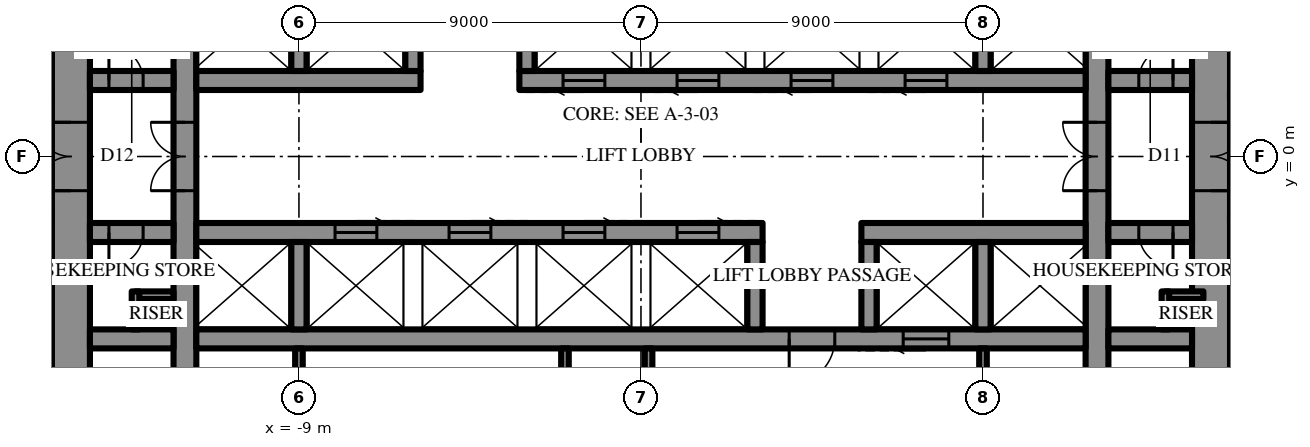
"""IFC4 building model, lengths in metres.
Left out: names, types, materials, properties, quantities, classifications, styles, units other than length and angle.
Written with IfcOpenShell. Run it as: python <this file> out.ifc"""

import sys

from ifc_helpers import new_model, si_unit, direction, frame, frame_2d, origin, place, context, subcontext, project, spatial, rectangle, extrude, element, fill, save


model = new_model("IFC4")
c1 = context("Model", 3, precision=1e-05, world=origin(), true_north=direction((0.0, 1.0)))
c2 = subcontext(c1, "Body", "Model", "MODEL_VIEW")
j1 = project(units=[si_unit("LENGTHUNIT", "METRE"), si_unit("PLANEANGLEUNIT", "RADIAN")], contexts=[c1])
p1 = place(None, origin())
s1 = spatial("IfcSite", under=j1, at=p1, CompositionType="ELEMENT")
p2 = place(p1, origin())
s2 = spatial("IfcBuilding", under=s1, at=p2, CompositionType="ELEMENT")
p3 = place(p2, frame((0.0, 0.0, 249.1)))
s3 = spatial("IfcBuildingStorey", under=s2, at=p3, CompositionType="ELEMENT", Elevation=249.1)
p4 = place(p3, frame((15.0, -10.7, 0.0), z_axis=(0.0, 0.0, 1.0), x_axis=(0.0, 1.0, 0.0)))
e1 = element("IfcWall", 1, at=p4, inside=s3, PredefinedType="SHEAR", context=c2, shape_type="SweptSolid", body=[
    extrude(rectangle(XDim=21.4, YDim=1.0, at=frame_2d((10.7, 0.0))), origin(), (0.0, 0.0, 1.0), 4.2),
])
p5 = place(p4, frame((9.8, 0.0, 0.0)))
e2 = element("IfcOpeningElement", 2, at=p5, cuts=e1, PredefinedType="OPENING", context=c2, shape_type="SweptSolid", body=[
    extrude(rectangle(XDim=1.8, YDim=2.4, at=frame_2d((0.9, 1.2))), frame((0.0, 0.51, 0.0), z_axis=(0.0, -1.0, 0.0), x_axis=(1.0, 0.0, 0.0)), (0.0, 0.0, 1.0), 1.02),
])
p6 = place(p3, frame((-15.0, 10.7, 0.0), z_axis=(0.0, 0.0, 1.0), x_axis=(0.0, -1.0, 0.0)))
e3 = element("IfcWall", 3, at=p6, inside=s3, PredefinedType="SHEAR", context=c2, shape_type="SweptSolid", body=[
    extrude(rectangle(XDim=21.4, YDim=1.0, at=frame_2d((10.7, 0.0))), origin(), (0.0, 0.0, 1.0), 4.2),
])
p7 = place(p6, frame((9.8, 0.0, 0.0)))
e4 = element("IfcOpeningElement", 4, at=p7, cuts=e3, PredefinedType="OPENING", context=c2, shape_type="SweptSolid", body=[
    extrude(rectangle(XDim=1.8, YDim=2.4, at=frame_2d((0.9, 1.2))), frame((0.0, 0.51, 0.0), z_axis=(0.0, -1.0, 0.0), x_axis=(1.0, 0.0, 0.0)), (0.0, 0.0, 1.0), 1.02),
])
p8 = place(p3, frame((12.0, -10.7, 0.0), z_axis=(0.0, 0.0, 1.0), x_axis=(0.0, 1.0, 0.0)))
e5 = element("IfcWall", 5, at=p8, inside=s3, PredefinedType="SHEAR", context=c2, shape_type="SweptSolid", body=[
    extrude(rectangle(XDim=21.4, YDim=0.6, at=frame_2d((10.7, 0.0))), origin(), (0.0, 0.0, 1.0), 4.2),
])
p9 = place(p8, frame((9.8, 0.0, 0.0)))
e6 = element("IfcOpeningElement", 6, at=p9, cuts=e5, PredefinedType="OPENING", context=c2, shape_type="SweptSolid", body=[
    extrude(rectangle(XDim=1.8, YDim=2.4, at=frame_2d((0.9, 1.2))), frame((0.0, 0.31, 0.0), z_axis=(0.0, -1.0, 0.0), x_axis=(1.0, 0.0, 0.0)), (0.0, 0.0, 1.0), 0.62),
])
p10 = place(p3, frame((-12.0, -10.7, 0.0), z_axis=(0.0, 0.0, 1.0), x_axis=(0.0, 1.0, 0.0)))
e7 = element("IfcWall", 7, at=p10, inside=s3, PredefinedType="SHEAR", context=c2, shape_type="SweptSolid", body=[
    extrude(rectangle(XDim=21.4, YDim=0.6, at=frame_2d((10.7, 0.0))), origin(), (0.0, 0.0, 1.0), 4.2),
])
p11 = place(p10, frame((9.8, 0.0, 0.0)))
e8 = element("IfcOpeningElement", 8, at=p11, cuts=e7, PredefinedType="OPENING", context=c2, shape_type="SweptSolid", body=[
    extrude(rectangle(XDim=1.8, YDim=2.4, at=frame_2d((0.9, 1.2))), frame((0.0, 0.31, 0.0), z_axis=(0.0, -1.0, 0.0), x_axis=(1.0, 0.0, 0.0)), (0.0, 0.0, 1.0), 0.62),
])
p12 = place(p3, frame((-14.5, 2.0, 0.0), z_axis=(0.0, 0.0, 1.0), x_axis=(1.0, 0.0, 0.0)))
e9 = element("IfcWall", 9, at=p12, inside=s3, PredefinedType="SHEAR", context=c2, shape_type="SweptSolid", body=[
    extrude(rectangle(XDim=2.2, YDim=0.5, at=frame_2d((1.1, 0.0))), origin(), (0.0, 0.0, 1.0), 4.2),
])
p13 = place(p12, frame((0.5, 0.0, 0.0)))
e10 = element("IfcOpeningElement", 10, at=p13, cuts=e9, PredefinedType="OPENING", context=c2, shape_type="SweptSolid", body=[
    extrude(rectangle(XDim=0.9, YDim=2.2, at=frame_2d((0.45, 1.1))), frame((0.0, 0.26, 0.0), z_axis=(0.0, -1.0, 0.0), x_axis=(1.0, 0.0, 0.0)), (0.0, 0.0, 1.0), 0.52),
])
p14 = place(p3, frame((-11.7, 2.0, 0.0), z_axis=(0.0, 0.0, 1.0), x_axis=(1.0, 0.0, 0.0)))
e11 = element("IfcWall", 11, at=p14, inside=s3, PredefinedType="SHEAR", context=c2, shape_type="SweptSolid", body=[
    extrude(rectangle(XDim=5.9, YDim=0.5, at=frame_2d((2.95, 0.0))), origin(), (0.0, 0.0, 1.0), 4.2),
])
p15 = place(p3, frame((-3.2, 2.0, 0.0), z_axis=(0.0, 0.0, 1.0), x_axis=(1.0, 0.0, 0.0)))
e12 = element("IfcWall", 12, at=p15, inside=s3, PredefinedType="SHEAR", context=c2, shape_type="SweptSolid", body=[
    extrude(rectangle(XDim=14.9, YDim=0.5, at=frame_2d((7.45, 0.0))), origin(), (0.0, 0.0, 1.0), 4.2),
])
p16 = place(p15, frame((1.15, 0.0, 0.0)))
e13 = element("IfcOpeningElement", 13, at=p16, cuts=e12, PredefinedType="OPENING", context=c2, shape_type="SweptSolid", body=[
    extrude(rectangle(XDim=1.1, YDim=2.2, at=frame_2d((0.55, 1.1))), frame((0.0, 0.26, 0.0), z_axis=(0.0, -1.0, 0.0), x_axis=(1.0, 0.0, 0.0)), (0.0, 0.0, 1.0), 0.52),
])
p17 = place(p15, frame((4.15, 0.0, 0.0)))
e14 = element("IfcOpeningElement", 14, at=p17, cuts=e12, PredefinedType="OPENING", context=c2, shape_type="SweptSolid", body=[
    extrude(rectangle(XDim=1.1, YDim=2.2, at=frame_2d((0.55, 1.1))), frame((0.0, 0.26, 0.0), z_axis=(0.0, -1.0, 0.0), x_axis=(1.0, 0.0, 0.0)), (0.0, 0.0, 1.0), 0.52),
])
p18 = place(p15, frame((7.15, 0.0, 0.0)))
e15 = element("IfcOpeningElement", 15, at=p18, cuts=e12, PredefinedType="OPENING", context=c2, shape_type="SweptSolid", body=[
    extrude(rectangle(XDim=1.1, YDim=2.2, at=frame_2d((0.55, 1.1))), frame((0.0, 0.26, 0.0), z_axis=(0.0, -1.0, 0.0), x_axis=(1.0, 0.0, 0.0)), (0.0, 0.0, 1.0), 0.52),
])
p19 = place(p15, frame((10.15, 0.0, 0.0)))
e16 = element("IfcOpeningElement", 16, at=p19, cuts=e12, PredefinedType="OPENING", context=c2, shape_type="SweptSolid", body=[
    extrude(rectangle(XDim=1.1, YDim=2.2, at=frame_2d((0.55, 1.1))), frame((0.0, 0.26, 0.0), z_axis=(0.0, -1.0, 0.0), x_axis=(1.0, 0.0, 0.0)), (0.0, 0.0, 1.0), 0.52),
])
p20 = place(p3, frame((12.3, 2.0, 0.0), z_axis=(0.0, 0.0, 1.0), x_axis=(1.0, 0.0, 0.0)))
e17 = element("IfcWall", 17, at=p20, inside=s3, PredefinedType="SHEAR", context=c2, shape_type="SweptSolid", body=[
    extrude(rectangle(XDim=2.2, YDim=0.5, at=frame_2d((1.1, 0.0))), origin(), (0.0, 0.0, 1.0), 4.2),
])
p21 = place(p20, frame((0.8, 0.0, 0.0)))
e18 = element("IfcOpeningElement", 18, at=p21, cuts=e17, PredefinedType="OPENING", context=c2, shape_type="SweptSolid", body=[
    extrude(rectangle(XDim=0.9, YDim=2.2, at=frame_2d((0.45, 1.1))), frame((0.0, 0.26, 0.0), z_axis=(0.0, -1.0, 0.0), x_axis=(1.0, 0.0, 0.0)), (0.0, 0.0, 1.0), 0.52),
])
for number, where, z_axis, x_axis in (
    (19, (-9.0, 2.25, 0.0), (0.0, 0.0, 1.0), (0.0, 1.0, 0.0)),
    (20, (-6.0, 2.25, 0.0), (0.0, 0.0, 1.0), (0.0, 1.0, 0.0)),
    (21, (-3.0, 2.25, 0.0), (0.0, 0.0, 1.0), (0.0, 1.0, 0.0)),
    (22, (9.0, 2.25, 0.0), (0.0, 0.0, 1.0), (0.0, 1.0, 0.0)),
):
    element("IfcWall", number, at=place(p3, frame(where, z_axis=z_axis, x_axis=x_axis)), inside=s3, PredefinedType="SHEAR", context=c2, shape_type="SweptSolid", body=[
        extrude(rectangle(XDim=2.3, YDim=0.4, at=frame_2d((1.15, 0.0))), origin(), (0.0, 0.0, 1.0), 4.2),
    ])
p22 = place(p3, frame((14.5, -2.0, 0.0), z_axis=(0.0, 0.0, 1.0), x_axis=(-1.0, 0.0, 0.0)))
e23 = element("IfcWall", 23, at=p22, inside=s3, PredefinedType="SHEAR", context=c2, shape_type="SweptSolid", body=[
    extrude(rectangle(XDim=2.2, YDim=0.5, at=frame_2d((1.1, 0.0))), origin(), (0.0, 0.0, 1.0), 4.2),
])
p23 = place(p22, frame((0.5, 0.0, 0.0)))
e24 = element("IfcOpeningElement", 24, at=p23, cuts=e23, PredefinedType="OPENING", context=c2, shape_type="SweptSolid", body=[
    extrude(rectangle(XDim=0.9, YDim=2.2, at=frame_2d((0.45, 1.1))), frame((0.0, 0.26, 0.0), z_axis=(0.0, -1.0, 0.0), x_axis=(1.0, 0.0, 0.0)), (0.0, 0.0, 1.0), 0.52),
])
p24 = place(p3, frame((11.7, -2.0, 0.0), z_axis=(0.0, 0.0, 1.0), x_axis=(-1.0, 0.0, 0.0)))
e25 = element("IfcWall", 25, at=p24, inside=s3, PredefinedType="SHEAR", context=c2, shape_type="SweptSolid", body=[
    extrude(rectangle(XDim=5.9, YDim=0.5, at=frame_2d((2.95, 0.0))), origin(), (0.0, 0.0, 1.0), 4.2),
])
p25 = place(p3, frame((3.2, -2.0, 0.0), z_axis=(0.0, 0.0, 1.0), x_axis=(-1.0, 0.0, 0.0)))
e26 = element("IfcWall", 26, at=p25, inside=s3, PredefinedType="SHEAR", context=c2, shape_type="SweptSolid", body=[
    extrude(rectangle(XDim=14.9, YDim=0.5, at=frame_2d((7.45, 0.0))), origin(), (0.0, 0.0, 1.0), 4.2),
])
p26 = place(p25, frame((1.15, 0.0, 0.0)))
e27 = element("IfcOpeningElement", 27, at=p26, cuts=e26, PredefinedType="OPENING", context=c2, shape_type="SweptSolid", body=[
    extrude(rectangle(XDim=1.1, YDim=2.2, at=frame_2d((0.55, 1.1))), frame((0.0, 0.26, 0.0), z_axis=(0.0, -1.0, 0.0), x_axis=(1.0, 0.0, 0.0)), (0.0, 0.0, 1.0), 0.52),
])
p27 = place(p25, frame((4.15, 0.0, 0.0)))
e28 = element("IfcOpeningElement", 28, at=p27, cuts=e26, PredefinedType="OPENING", context=c2, shape_type="SweptSolid", body=[
    extrude(rectangle(XDim=1.1, YDim=2.2, at=frame_2d((0.55, 1.1))), frame((0.0, 0.26, 0.0), z_axis=(0.0, -1.0, 0.0), x_axis=(1.0, 0.0, 0.0)), (0.0, 0.0, 1.0), 0.52),
])
p28 = place(p25, frame((7.15, 0.0, 0.0)))
e29 = element("IfcOpeningElement", 29, at=p28, cuts=e26, PredefinedType="OPENING", context=c2, shape_type="SweptSolid", body=[
    extrude(rectangle(XDim=1.1, YDim=2.2, at=frame_2d((0.55, 1.1))), frame((0.0, 0.26, 0.0), z_axis=(0.0, -1.0, 0.0), x_axis=(1.0, 0.0, 0.0)), (0.0, 0.0, 1.0), 0.52),
])
p29 = place(p25, frame((10.15, 0.0, 0.0)))
e30 = element("IfcOpeningElement", 30, at=p29, cuts=e26, PredefinedType="OPENING", context=c2, shape_type="SweptSolid", body=[
    extrude(rectangle(XDim=1.1, YDim=2.2, at=frame_2d((0.55, 1.1))), frame((0.0, 0.26, 0.0), z_axis=(0.0, -1.0, 0.0), x_axis=(1.0, 0.0, 0.0)), (0.0, 0.0, 1.0), 0.52),
])
p30 = place(p3, frame((-12.3, -2.0, 0.0), z_axis=(0.0, 0.0, 1.0), x_axis=(-1.0, 0.0, 0.0)))
e31 = element("IfcWall", 31, at=p30, inside=s3, PredefinedType="SHEAR", context=c2, shape_type="SweptSolid", body=[
    extrude(rectangle(XDim=2.2, YDim=0.5, at=frame_2d((1.1, 0.0))), origin(), (0.0, 0.0, 1.0), 4.2),
])
p31 = place(p30, frame((0.8, 0.0, 0.0)))
e32 = element("IfcOpeningElement", 32, at=p31, cuts=e31, PredefinedType="OPENING", context=c2, shape_type="SweptSolid", body=[
    extrude(rectangle(XDim=0.9, YDim=2.2, at=frame_2d((0.45, 1.1))), frame((0.0, 0.26, 0.0), z_axis=(0.0, -1.0, 0.0), x_axis=(1.0, 0.0, 0.0)), (0.0, 0.0, 1.0), 0.52),
])
p32 = place(p3, frame((14.5, -4.8, 0.0), z_axis=(0.0, 0.0, 1.0), x_axis=(-1.0, 0.0, 0.0)))
e33 = element("IfcWall", 33, at=p32, inside=s3, PredefinedType="SHEAR", context=c2, shape_type="SweptSolid", body=[
    extrude(rectangle(XDim=2.2, YDim=0.5, at=frame_2d((1.1, 0.0))), origin(), (0.0, 0.0, 1.0), 4.2),
])
p33 = place(p3, frame((11.7, -4.8, 0.0), z_axis=(0.0, 0.0, 1.0), x_axis=(-1.0, 0.0, 0.0)))
e34 = element("IfcWall", 34, at=p33, inside=s3, PredefinedType="SHEAR", context=c2, shape_type="SweptSolid", body=[
    extrude(rectangle(XDim=23.4, YDim=0.5, at=frame_2d((11.7, 0.0))), origin(), (0.0, 0.0, 1.0), 4.2),
])
p34 = place(p33, frame((6.6, 0.0, 0.0)))
e35 = element("IfcOpeningElement", 35, at=p34, cuts=e34, PredefinedType="OPENING", context=c2, shape_type="SweptSolid", body=[
    extrude(rectangle(XDim=1.2, YDim=2.2, at=frame_2d((0.6, 1.1))), frame((0.0, 0.26, 0.0), z_axis=(0.0, -1.0, 0.0), x_axis=(1.0, 0.0, 0.0)), (0.0, 0.0, 1.0), 0.52),
])
p35 = place(p33, frame((3.6, 0.0, 0.0)))
e36 = element("IfcOpeningElement", 36, at=p35, cuts=e34, PredefinedType="OPENING", context=c2, shape_type="SweptSolid", body=[
    extrude(rectangle(XDim=1.2, YDim=2.2, at=frame_2d((0.6, 1.1))), frame((0.0, 0.26, 0.0), z_axis=(0.0, -1.0, 0.0), x_axis=(1.0, 0.0, 0.0)), (0.0, 0.0, 1.0), 0.52),
])
p36 = place(p3, frame((-12.3, -4.8, 0.0), z_axis=(0.0, 0.0, 1.0), x_axis=(-1.0, 0.0, 0.0)))
e37 = element("IfcWall", 37, at=p36, inside=s3, PredefinedType="SHEAR", context=c2, shape_type="SweptSolid", body=[
    extrude(rectangle(XDim=2.2, YDim=0.5, at=frame_2d((1.1, 0.0))), origin(), (0.0, 0.0, 1.0), 4.2),
])
for number, where, z_axis, x_axis in (
    (38, (9.0, -2.25, 0.0), (0.0, 0.0, 1.0), (0.0, -1.0, 0.0)),
    (39, (6.0, -2.25, 0.0), (0.0, 0.0, 1.0), (0.0, -1.0, 0.0)),
    (40, (3.0, -2.25, 0.0), (0.0, 0.0, 1.0), (0.0, -1.0, 0.0)),
    (41, (-9.0, -2.25, 0.0), (0.0, 0.0, 1.0), (0.0, -1.0, 0.0)),
):
    element("IfcWall", number, at=place(p3, frame(where, z_axis=z_axis, x_axis=x_axis)), inside=s3, PredefinedType="SHEAR", context=c2, shape_type="SweptSolid", body=[
        extrude(rectangle(XDim=2.3, YDim=0.4, at=frame_2d((1.15, 0.0))), origin(), (0.0, 0.0, 1.0), 4.2),
    ])
p37 = place(p3, frame((0.2, -5.05, 0.0), z_axis=(0.0, 0.0, 1.0), x_axis=(0.0, -1.0, 0.0)))
e42 = element("IfcWall", 42, at=p37, inside=s3, PredefinedType="SHEAR", context=c2, shape_type="SweptSolid", body=[
    extrude(rectangle(XDim=5.65, YDim=0.2, at=frame_2d((2.825, 0.0))), origin(), (0.0, 0.0, 1.0), 4.2),
])
for number, where, z_axis, x_axis in (
    (43, (9.0, -5.05, 0.0), (0.0, 0.0, 1.0), (0.0, -1.0, 0.0)),
    (44, (-9.0, -5.05, 0.0), (0.0, 0.0, 1.0), (0.0, -1.0, 0.0)),
    (45, (-2.0, -5.05, 0.0), (0.0, 0.0, 1.0), (0.0, -1.0, 0.0)),
):
    element("IfcWall", number, at=place(p3, frame(where, z_axis=z_axis, x_axis=x_axis)), inside=s3, PredefinedType="PARTITIONING", context=c2, shape_type="SweptSolid", body=[
        extrude(rectangle(XDim=5.65, YDim=0.2, at=frame_2d((2.825, 0.0))), origin(), (0.0, 0.0, 1.0), 4.0),
    ])
for number, where, z_axis, x_axis in (
    (46, (14.8, -3.65, 0.0), (0.0, 0.0, 1.0), (-1.0, 0.0, 0.0)),
    (47, (13.8, -3.55, 0.0), (0.0, 0.0, 1.0), (0.0, -1.0, 0.0)),
    (48, (-12.3, -3.65, 0.0), (0.0, 0.0, 1.0), (-1.0, 0.0, 0.0)),
    (49, (-13.3, -3.55, 0.0), (0.0, 0.0, 1.0), (0.0, -1.0, 0.0)),
):
    element("IfcWall", number, at=place(p3, frame(where, z_axis=z_axis, x_axis=x_axis)), inside=s3, PredefinedType="PARTITIONING", context=c2, shape_type="SweptSolid", body=[
        extrude(rectangle(XDim=1.0, YDim=0.2, at=frame_2d((0.5, 0.0))), origin(), (0.0, 0.0, 1.0), 4.0),
    ])
p38 = place(p3, frame((15.5, 1.6, 0.0), z_axis=(0.0, 0.0, 1.0), x_axis=(1.0, 0.0, 0.0)))
e50 = element("IfcWall", 50, at=p38, inside=s3, PredefinedType="PARTITIONING", context=c2, shape_type="SweptSolid", body=[
    extrude(rectangle(XDim=2.3, YDim=0.2, at=frame_2d((1.15, 0.0))), origin(), (0.0, 0.0, 1.0), 4.0),
])
p39 = place(p5, frame((1.8, 0.0, 0.0), z_axis=(0.0, 0.0, 1.0), x_axis=(-1.0, 0.0, 0.0)))
e51 = element("IfcDoor", 51, at=p39, inside=s3, OperationType="DOUBLE_DOOR_SINGLE_SWING", PredefinedType="DOOR", context=c2, shape_type="SweptSolid", body=[
    extrude(rectangle(XDim=1.8, YDim=2.4, at=frame_2d((0.9, 1.2))), frame((0.0, 0.025, 0.0), z_axis=(0.0, -1.0, 0.0), x_axis=(1.0, 0.0, 0.0)), (0.0, 0.0, 1.0), 0.05),
])
fill(e2, e51)
p40 = place(p7, frame((1.8, 0.0, 0.0), z_axis=(0.0, 0.0, 1.0), x_axis=(-1.0, 0.0, 0.0)))
e52 = element("IfcDoor", 52, at=p40, inside=s3, OperationType="DOUBLE_DOOR_SINGLE_SWING", PredefinedType="DOOR", context=c2, shape_type="SweptSolid", body=[
    extrude(rectangle(XDim=1.8, YDim=2.4, at=frame_2d((0.9, 1.2))), frame((0.0, 0.025, 0.0), z_axis=(0.0, -1.0, 0.0), x_axis=(1.0, 0.0, 0.0)), (0.0, 0.0, 1.0), 0.05),
])
fill(e4, e52)
p41 = place(p34, origin())
e53 = element("IfcDoor", 53, at=p41, inside=s3, OperationType="SINGLE_SWING_LEFT", PredefinedType="DOOR", context=c2, shape_type="SweptSolid", body=[
    extrude(rectangle(XDim=1.2, YDim=2.2, at=frame_2d((0.6, 1.1))), frame((0.0, 0.025, 0.0), z_axis=(0.0, -1.0, 0.0), x_axis=(1.0, 0.0, 0.0)), (0.0, 0.0, 1.0), 0.05),
])
fill(e35, e53)
p42 = place(p13, origin())
e54 = element("IfcDoor", 54, at=p42, inside=s3, OperationType="SINGLE_SWING_RIGHT", PredefinedType="DOOR", context=c2, shape_type="SweptSolid", body=[
    extrude(rectangle(XDim=0.9, YDim=2.2, at=frame_2d((0.45, 1.1))), frame((0.0, 0.025, 0.0), z_axis=(0.0, -1.0, 0.0), x_axis=(1.0, 0.0, 0.0)), (0.0, 0.0, 1.0), 0.05),
])
fill(e10, e54)
p43 = place(p21, origin())
e55 = element("IfcDoor", 55, at=p43, inside=s3, OperationType="SINGLE_SWING_LEFT", PredefinedType="DOOR", context=c2, shape_type="SweptSolid", body=[
    extrude(rectangle(XDim=0.9, YDim=2.2, at=frame_2d((0.45, 1.1))), frame((0.0, 0.025, 0.0), z_axis=(0.0, -1.0, 0.0), x_axis=(1.0, 0.0, 0.0)), (0.0, 0.0, 1.0), 0.05),
])
fill(e18, e55)
p44 = place(p23, origin())
e56 = element("IfcDoor", 56, at=p44, inside=s3, OperationType="SINGLE_SWING_RIGHT", PredefinedType="DOOR", context=c2, shape_type="SweptSolid", body=[
    extrude(rectangle(XDim=0.9, YDim=2.2, at=frame_2d((0.45, 1.1))), frame((0.0, 0.025, 0.0), z_axis=(0.0, -1.0, 0.0), x_axis=(1.0, 0.0, 0.0)), (0.0, 0.0, 1.0), 0.05),
])
fill(e24, e56)
p45 = place(p31, origin())
e57 = element("IfcDoor", 57, at=p45, inside=s3, OperationType="SINGLE_SWING_LEFT", PredefinedType="DOOR", context=c2, shape_type="SweptSolid", body=[
    extrude(rectangle(XDim=0.9, YDim=2.2, at=frame_2d((0.45, 1.1))), frame((0.0, 0.025, 0.0), z_axis=(0.0, -1.0, 0.0), x_axis=(1.0, 0.0, 0.0)), (0.0, 0.0, 1.0), 0.05),
])
fill(e32, e57)
p46 = place(p9, origin())
e58 = element("IfcDoor", 58, at=p46, inside=s3, OperationType="DOUBLE_DOOR_SINGLE_SWING", PredefinedType="DOOR", context=c2, shape_type="SweptSolid", body=[
    extrude(rectangle(XDim=1.8, YDim=2.4, at=frame_2d((0.9, 1.2))), frame((0.0, 0.025, 0.0), z_axis=(0.0, -1.0, 0.0), x_axis=(1.0, 0.0, 0.0)), (0.0, 0.0, 1.0), 0.05),
])
fill(e6, e58)
p47 = place(p11, origin())
e59 = element("IfcDoor", 59, at=p47, inside=s3, OperationType="DOUBLE_DOOR_SINGLE_SWING", PredefinedType="DOOR", context=c2, shape_type="SweptSolid", body=[
    extrude(rectangle(XDim=1.8, YDim=2.4, at=frame_2d((0.9, 1.2))), frame((0.0, 0.025, 0.0), z_axis=(0.0, -1.0, 0.0), x_axis=(1.0, 0.0, 0.0)), (0.0, 0.0, 1.0), 0.05),
])
fill(e8, e59)
p48 = place(p16, frame((1.1, 0.0, 0.0), z_axis=(0.0, 0.0, 1.0), x_axis=(-1.0, 0.0, 0.0)))
e60 = element("IfcDoor", 60, at=p48, inside=s3, OperationType="SLIDING_TO_LEFT", PredefinedType="DOOR", context=c2, shape_type="SweptSolid", body=[
    extrude(rectangle(XDim=1.1, YDim=2.2, at=frame_2d((0.55, 1.1))), frame((0.0, 0.025, 0.0), z_axis=(0.0, -1.0, 0.0), x_axis=(1.0, 0.0, 0.0)), (0.0, 0.0, 1.0), 0.05),
])
fill(e13, e60)
p49 = place(p17, frame((1.1, 0.0, 0.0), z_axis=(0.0, 0.0, 1.0), x_axis=(-1.0, 0.0, 0.0)))
e61 = element("IfcDoor", 61, at=p49, inside=s3, OperationType="SLIDING_TO_LEFT", PredefinedType="DOOR", context=c2, shape_type="SweptSolid", body=[
    extrude(rectangle(XDim=1.1, YDim=2.2, at=frame_2d((0.55, 1.1))), frame((0.0, 0.025, 0.0), z_axis=(0.0, -1.0, 0.0), x_axis=(1.0, 0.0, 0.0)), (0.0, 0.0, 1.0), 0.05),
])
fill(e14, e61)
p50 = place(p18, frame((1.1, 0.0, 0.0), z_axis=(0.0, 0.0, 1.0), x_axis=(-1.0, 0.0, 0.0)))
e62 = element("IfcDoor", 62, at=p50, inside=s3, OperationType="SLIDING_TO_LEFT", PredefinedType="DOOR", context=c2, shape_type="SweptSolid", body=[
    extrude(rectangle(XDim=1.1, YDim=2.2, at=frame_2d((0.55, 1.1))), frame((0.0, 0.025, 0.0), z_axis=(0.0, -1.0, 0.0), x_axis=(1.0, 0.0, 0.0)), (0.0, 0.0, 1.0), 0.05),
])
fill(e15, e62)
p51 = place(p19, frame((1.1, 0.0, 0.0), z_axis=(0.0, 0.0, 1.0), x_axis=(-1.0, 0.0, 0.0)))
e63 = element("IfcDoor", 63, at=p51, inside=s3, OperationType="SLIDING_TO_LEFT", PredefinedType="DOOR", context=c2, shape_type="SweptSolid", body=[
    extrude(rectangle(XDim=1.1, YDim=2.2, at=frame_2d((0.55, 1.1))), frame((0.0, 0.025, 0.0), z_axis=(0.0, -1.0, 0.0), x_axis=(1.0, 0.0, 0.0)), (0.0, 0.0, 1.0), 0.05),
])
fill(e16, e63)
p52 = place(p35, origin())
e64 = element("IfcDoor", 64, at=p52, inside=s3, OperationType="SLIDING_TO_LEFT", PredefinedType="DOOR", context=c2, shape_type="SweptSolid", body=[
    extrude(rectangle(XDim=1.2, YDim=2.2, at=frame_2d((0.6, 1.1))), frame((0.0, 0.025, 0.0), z_axis=(0.0, -1.0, 0.0), x_axis=(1.0, 0.0, 0.0)), (0.0, 0.0, 1.0), 0.05),
])
fill(e36, e64)
p53 = place(p26, frame((1.1, 0.0, 0.0), z_axis=(0.0, 0.0, 1.0), x_axis=(-1.0, 0.0, 0.0)))
e65 = element("IfcDoor", 65, at=p53, inside=s3, OperationType="SLIDING_TO_LEFT", PredefinedType="DOOR", context=c2, shape_type="SweptSolid", body=[
    extrude(rectangle(XDim=1.1, YDim=2.2, at=frame_2d((0.55, 1.1))), frame((0.0, 0.025, 0.0), z_axis=(0.0, -1.0, 0.0), x_axis=(1.0, 0.0, 0.0)), (0.0, 0.0, 1.0), 0.05),
])
fill(e27, e65)
p54 = place(p27, frame((1.1, 0.0, 0.0), z_axis=(0.0, 0.0, 1.0), x_axis=(-1.0, 0.0, 0.0)))
e66 = element("IfcDoor", 66, at=p54, inside=s3, OperationType="SLIDING_TO_LEFT", PredefinedType="DOOR", context=c2, shape_type="SweptSolid", body=[
    extrude(rectangle(XDim=1.1, YDim=2.2, at=frame_2d((0.55, 1.1))), frame((0.0, 0.025, 0.0), z_axis=(0.0, -1.0, 0.0), x_axis=(1.0, 0.0, 0.0)), (0.0, 0.0, 1.0), 0.05),
])
fill(e28, e66)
p55 = place(p28, frame((1.1, 0.0, 0.0), z_axis=(0.0, 0.0, 1.0), x_axis=(-1.0, 0.0, 0.0)))
e67 = element("IfcDoor", 67, at=p55, inside=s3, OperationType="SLIDING_TO_LEFT", PredefinedType="DOOR", context=c2, shape_type="SweptSolid", body=[
    extrude(rectangle(XDim=1.1, YDim=2.2, at=frame_2d((0.55, 1.1))), frame((0.0, 0.025, 0.0), z_axis=(0.0, -1.0, 0.0), x_axis=(1.0, 0.0, 0.0)), (0.0, 0.0, 1.0), 0.05),
])
fill(e29, e67)
p56 = place(p29, frame((1.1, 0.0, 0.0), z_axis=(0.0, 0.0, 1.0), x_axis=(-1.0, 0.0, 0.0)))
e68 = element("IfcDoor", 68, at=p56, inside=s3, OperationType="SLIDING_TO_LEFT", PredefinedType="DOOR", context=c2, shape_type="SweptSolid", body=[
    extrude(rectangle(XDim=1.1, YDim=2.2, at=frame_2d((0.55, 1.1))), frame((0.0, 0.025, 0.0), z_axis=(0.0, -1.0, 0.0), x_axis=(1.0, 0.0, 0.0)), (0.0, 0.0, 1.0), 0.05),
])
fill(e30, e68)
save(model, sys.argv[1])
